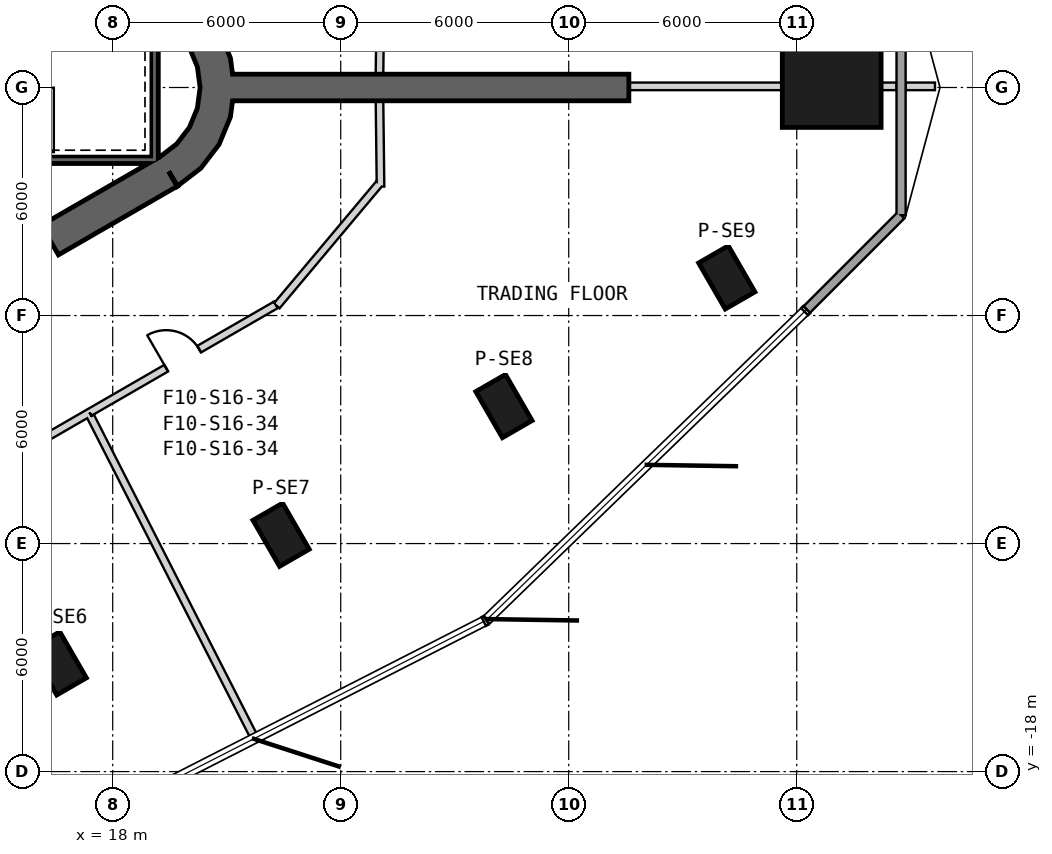
"""IFC4 building model, lengths in metres.
Left out: names, types, materials, properties, quantities, classifications, styles, units other than length and angle.
Written with IfcOpenShell. Run it as: python <this file> out.ifc"""

import sys

from ifc_helpers import new_model, si_unit, direction, frame, frame_2d, origin, origin_2d, place, context, subcontext, project, spatial, polyline, rectangle, outline, extrude, element, fill, save


model = new_model("IFC4")
c1 = context("Model", 3, precision=1e-05, world=origin(), true_north=direction((0.0, 1.0)))
c2 = subcontext(c1, "Body", "Model", "MODEL_VIEW")
j1 = project(units=[si_unit("LENGTHUNIT", "METRE"), si_unit("PLANEANGLEUNIT", "RADIAN")], contexts=[c1])
p1 = place(None, origin())
s1 = spatial("IfcSite", under=j1, at=p1, CompositionType="ELEMENT")
p2 = place(p1, origin())
s2 = spatial("IfcBuilding", under=s1, at=p2, CompositionType="ELEMENT")
p3 = place(p2, frame((0.0, 0.0, 253.2)))
s3 = spatial("IfcBuildingStorey", under=s2, at=p3, CompositionType="ELEMENT", Elevation=253.2)
p4 = place(p3, frame((36.92, 0.0, 0.0), z_axis=(0.0, 0.0, 1.0), x_axis=(1.0, 0.0, 0.0)))
e1 = element("IfcColumn", 1, at=p4, inside=s3, PredefinedType="COLUMN", context=c2, shape_type="SweptSolid", body=[
    extrude(rectangle(XDim=2.6, YDim=2.1, at=origin_2d()), origin(), (0.0, 0.0, 1.0), 4.0),
])
for number, where, z_axis, x_axis in (
    (2, (16.567, -15.154, 0.0), (0.0, 0.0, 1.0), (0.5, -0.866, 0.0)),
    (3, (22.431, -11.768, 0.0), (0.0, 0.0, 1.0), (0.5, -0.866, 0.0)),
    (4, (28.295, -8.383, 0.0), (0.0, 0.0, 1.0), (0.5, -0.866, 0.0)),
    (5, (34.159, -4.997, 0.0), (0.0, 0.0, 1.0), (0.5, -0.866, 0.0)),
):
    element("IfcColumn", number, at=place(p3, frame(where, z_axis=z_axis, x_axis=x_axis)), inside=s3, PredefinedType="COLUMN", context=c2, shape_type="SweptSolid", body=[
        extrude(rectangle(XDim=1.4, YDim=0.9, at=origin_2d()), origin(), (0.0, 0.0, 1.0), 4.0),
    ])
p5 = place(p3, frame((-7.825, -17.97, 0.0), z_axis=(0.0, 0.0, 1.0), x_axis=(0.866028369851, 0.499994862586, 0.0)))
e6 = element("IfcWall", 6, at=p5, inside=s3, PredefinedType="SHEAR", context=c2, shape_type="SweptSolid", body=[
    extrude(rectangle(XDim=31.523, YDim=0.9, at=frame_2d((15.762, 0.0))), origin(), (0.0, 0.0, 1.0), 4.0),
])
p6 = place(p5, frame((7.062, 0.0, 0.0)))
e7 = element("IfcOpeningElement", 7, at=p6, cuts=e6, PredefinedType="OPENING", context=c2, shape_type="SweptSolid", body=[
    extrude(rectangle(XDim=1.2, YDim=2.4, at=frame_2d((0.6, 1.2))), frame((0.0, 0.46, 0.0), z_axis=(0.0, -1.0, 0.0), x_axis=(1.0, 0.0, 0.0)), (0.0, 0.0, 1.0), 0.92),
])
p7 = place(p5, frame((9.762, 0.0, 0.0)))
e8 = element("IfcOpeningElement", 8, at=p7, cuts=e6, PredefinedType="OPENING", context=c2, shape_type="SweptSolid", body=[
    extrude(rectangle(XDim=1.2, YDim=2.4, at=frame_2d((0.6, 1.2))), frame((0.0, 0.46, 0.0), z_axis=(0.0, -1.0, 0.0), x_axis=(1.0, 0.0, 0.0)), (0.0, 0.0, 1.0), 0.92),
])
p8 = place(p5, frame((12.462, 0.0, 0.0)))
e9 = element("IfcOpeningElement", 9, at=p8, cuts=e6, PredefinedType="OPENING", context=c2, shape_type="SweptSolid", body=[
    extrude(rectangle(XDim=1.2, YDim=2.4, at=frame_2d((0.6, 1.2))), frame((0.0, 0.46, 0.0), z_axis=(0.0, -1.0, 0.0), x_axis=(1.0, 0.0, 0.0)), (0.0, 0.0, 1.0), 0.92),
])
p9 = place(p5, frame((15.162, 0.0, 0.0)))
e10 = element("IfcOpeningElement", 10, at=p9, cuts=e6, PredefinedType="OPENING", context=c2, shape_type="SweptSolid", body=[
    extrude(rectangle(XDim=1.2, YDim=2.4, at=frame_2d((0.6, 1.2))), frame((0.0, 0.46, 0.0), z_axis=(0.0, -1.0, 0.0), x_axis=(1.0, 0.0, 0.0)), (0.0, 0.0, 1.0), 0.92),
])
p10 = place(p5, frame((17.862, 0.0, 0.0)))
e11 = element("IfcOpeningElement", 11, at=p10, cuts=e6, PredefinedType="OPENING", context=c2, shape_type="SweptSolid", body=[
    extrude(rectangle(XDim=1.2, YDim=2.4, at=frame_2d((0.6, 1.2))), frame((0.0, 0.46, 0.0), z_axis=(0.0, -1.0, 0.0), x_axis=(1.0, 0.0, 0.0)), (0.0, 0.0, 1.0), 0.92),
])
p11 = place(p5, frame((20.562, 0.0, 0.0)))
e12 = element("IfcOpeningElement", 12, at=p11, cuts=e6, PredefinedType="OPENING", context=c2, shape_type="SweptSolid", body=[
    extrude(rectangle(XDim=1.2, YDim=2.4, at=frame_2d((0.6, 1.2))), frame((0.0, 0.46, 0.0), z_axis=(0.0, -1.0, 0.0), x_axis=(1.0, 0.0, 0.0)), (0.0, 0.0, 1.0), 0.92),
])
p12 = place(p5, frame((26.712, 0.0, 0.0)))
e13 = element("IfcOpeningElement", 13, at=p12, cuts=e6, PredefinedType="OPENING", context=c2, shape_type="SweptSolid", body=[
    extrude(rectangle(XDim=1.2, YDim=2.4, at=frame_2d((0.6, 1.2))), frame((0.0, 0.46, 0.0), z_axis=(0.0, -1.0, 0.0), x_axis=(1.0, 0.0, 0.0)), (0.0, 0.0, 1.0), 0.92),
])
p13 = place(p5, frame((3.612, 0.0, 0.0)))
e14 = element("IfcOpeningElement", 14, at=p13, cuts=e6, PredefinedType="OPENING", context=c2, shape_type="SweptSolid", body=[
    extrude(rectangle(XDim=1.2, YDim=2.4, at=frame_2d((0.6, 1.2))), frame((0.0, 0.46, 0.0), z_axis=(0.0, -1.0, 0.0), x_axis=(1.0, 0.0, 0.0)), (0.0, 0.0, 1.0), 0.92),
])
p14 = place(p3, origin())
e15 = element("IfcWall", 15, at=p14, inside=s3, PredefinedType="SHEAR", context=c2, shape_type="SweptSolid", body=[
    extrude(outline(polyline([(19.7, -2.598), (20.321, -2.121), (20.798, -1.5), (21.098, -0.777), (21.2, 0.0), (21.098, 0.777), (20.798, 1.5), (20.321, 2.121), (19.7, 2.598), (19.25, 1.819), (19.685, 1.485), (20.019, 1.05), (20.229, 0.543), (20.3, 0.0), (20.229, -0.543), (20.019, -1.05), (19.685, -1.485), (19.25, -1.819), (19.7, -2.598)])), origin(), (0.0, 0.0, 1.0), 4.0),
])
p15 = place(p3, frame((21.15, 0.0, 0.0), z_axis=(0.0, 0.0, 1.0), x_axis=(1.0, 0.0, 0.0)))
e16 = element("IfcWall", 16, at=p15, inside=s3, PredefinedType="SHEAR", context=c2, shape_type="SweptSolid", body=[
    extrude(rectangle(XDim=10.433, YDim=0.7, at=frame_2d((5.216, 0.0))), origin(), (0.0, 0.0, 1.0), 4.0),
])
p16 = place(p3, frame((36.263, -5.842, 0.0), z_axis=(0.0, 0.0, 1.0), x_axis=(0.707106781187, 0.707106781187, 0.0)))
e17 = element("IfcWall", 17, at=p16, inside=s3, PredefinedType="SOLIDWALL", context=c2, shape_type="SweptSolid", body=[
    extrude(rectangle(XDim=3.51, YDim=0.24, at=frame_2d((1.755, 0.0))), origin(), (0.0, 0.0, 1.0), 3.7),
])
p17 = place(p3, frame((38.745, -3.36, 0.0), z_axis=(0.0, 0.0, 1.0), x_axis=(0.0, 1.0, 0.0)))
e18 = element("IfcWall", 18, at=p17, inside=s3, PredefinedType="SOLIDWALL", context=c2, shape_type="SweptSolid", body=[
    extrude(rectangle(XDim=6.72, YDim=0.24, at=frame_2d((3.36, 0.0))), origin(), (0.0, 0.0, 1.0), 3.7),
])
p18 = place(p3, frame((19.1, -2.0, -0.3), z_axis=(0.0, 0.0, 1.0), x_axis=(0.0, 1.0, 0.0)))
e19 = element("IfcWall", 19, at=p18, inside=s3, PredefinedType="SHEAR", context=c2, shape_type="SweptSolid", body=[
    extrude(rectangle(XDim=3.8, YDim=0.2, at=frame_2d((1.9, 0.0))), origin(), (0.0, 0.0, 1.0), 4.0),
])
p19 = place(p3, frame((11.1, -1.9, -0.3), z_axis=(0.0, 0.0, 1.0), x_axis=(1.0, 0.0, 0.0)))
e20 = element("IfcWall", 20, at=p19, inside=s3, PredefinedType="SHEAR", context=c2, shape_type="SweptSolid", body=[
    extrude(rectangle(XDim=7.9, YDim=0.2, at=frame_2d((3.95, 0.0))), origin(), (0.0, 0.0, 1.0), 4.0),
])
p20 = place(p3, frame((25.021, 0.35, 0.0), z_axis=(0.0, 0.0, 1.0), x_axis=(0.012334587904, 0.999923926077, 0.0)))
e21 = element("IfcWall", 21, at=p20, inside=s3, PredefinedType="PARTITIONING", context=c2, shape_type="SweptSolid", body=[
    extrude(rectangle(XDim=2.078, YDim=0.2, at=frame_2d((1.039, 0.0))), origin(), (0.0, 0.0, 1.0), 3.7),
])
p21 = place(p3, frame((25.048, -2.608, 0.0), z_axis=(0.0, 0.0, 1.0), x_axis=(-0.012000433251, 0.999927992208, 0.0)))
e22 = element("IfcWall", 22, at=p21, inside=s3, PredefinedType="PARTITIONING", context=c2, shape_type="SweptSolid", body=[
    extrude(rectangle(XDim=2.258, YDim=0.2, at=frame_2d((1.129, 0.0))), origin(), (0.0, 0.0, 1.0), 3.7),
])
p22 = place(p3, frame((22.315, -5.746, 0.0), z_axis=(0.0, 0.0, 1.0), x_axis=(0.642828004621, 0.76601054593, 0.0)))
e23 = element("IfcWall", 23, at=p22, inside=s3, PredefinedType="PARTITIONING", context=c2, shape_type="SweptSolid", body=[
    extrude(rectangle(XDim=4.2, YDim=0.2, at=frame_2d((2.1, 0.0))), origin(), (0.0, 0.0, 1.0), 2.88),
])
p23 = place(p3, frame((6.275, -14.968, 0.0), z_axis=(0.0, 0.0, 1.0), x_axis=(0.866025615516, 0.499999633269, 0.0)))
e24 = element("IfcWall", 24, at=p23, inside=s3, PredefinedType="PARTITIONING", context=c2, shape_type="SweptSolid", body=[
    extrude(rectangle(XDim=12.834, YDim=0.2, at=frame_2d((6.417, 0.0))), origin(), (0.0, 0.0, 1.0), 2.98),
])
p24 = place(p3, frame((17.39, -8.551, 0.0), z_axis=(0.0, 0.0, 1.0), x_axis=(0.866034791923, 0.499983738914, 0.0)))
e25 = element("IfcWall", 25, at=p24, inside=s3, PredefinedType="PARTITIONING", context=c2, shape_type="SweptSolid", body=[
    extrude(rectangle(XDim=5.662, YDim=0.2, at=frame_2d((2.831, 0.0))), origin(), (0.0, 0.0, 1.0), 2.98),
])
p25 = place(p24, frame((2.331, 0.0, 0.0)))
e26 = element("IfcOpeningElement", 26, at=p25, cuts=e25, PredefinedType="OPENING", context=c2, shape_type="SweptSolid", body=[
    extrude(rectangle(XDim=1.0, YDim=2.1, at=frame_2d((0.5, 1.05))), frame((0.0, 0.11, 0.0), z_axis=(0.0, -1.0, 0.0), x_axis=(1.0, 0.0, 0.0)), (0.0, 0.0, 1.0), 0.22),
])
p26 = place(p3, frame((31.583, 0.03, 0.0), z_axis=(0.0, 0.0, 1.0), x_axis=(1.0, 0.0, 0.0)))
e27 = element("IfcWall", 27, at=p26, inside=s3, PredefinedType="PARTITIONING", context=c2, shape_type="SweptSolid", body=[
    extrude(rectangle(XDim=4.038, YDim=0.2, at=frame_2d((2.019, 0.0))), origin(), (0.0, 0.0, 1.0), 3.27),
])
p27 = place(p3, frame((38.22, 0.03, 0.0), z_axis=(0.0, 0.0, 1.0), x_axis=(1.0, 0.0, 0.0)))
e28 = element("IfcWall", 28, at=p27, inside=s3, PredefinedType="PARTITIONING", context=c2, shape_type="SweptSolid", body=[
    extrude(rectangle(XDim=0.406, YDim=0.2, at=frame_2d((0.203, 0.0))), origin(), (0.0, 0.0, 1.0), 3.7),
])
p28 = place(p3, frame((38.865, 0.03, 0.0), z_axis=(0.0, 0.0, 1.0), x_axis=(1.0, 0.0, 0.0)))
e29 = element("IfcWall", 29, at=p28, inside=s3, PredefinedType="PARTITIONING", context=c2, shape_type="SweptSolid", body=[
    extrude(rectangle(XDim=0.772, YDim=0.2, at=frame_2d((0.386, 0.0))), origin(), (0.0, 0.0, 1.0), 3.7),
])
p29 = place(p3, frame((17.416, -8.651, 0.0), z_axis=(0.0, 0.0, 1.0), x_axis=(0.45442670118, -0.890784133926, 0.0)))
e30 = element("IfcWall", 30, at=p29, inside=s3, PredefinedType="PARTITIONING", context=c2, shape_type="SweptSolid", body=[
    extrude(rectangle(XDim=9.512, YDim=0.2, at=frame_2d((4.756, 0.0))), origin(), (0.0, 0.0, 1.0), 2.98),
])
p30 = place(p25, origin())
e31 = element("IfcDoor", 31, at=p30, inside=s3, OperationType="SINGLE_SWING_RIGHT", PredefinedType="USERDEFINED", context=c2, shape_type="SweptSolid", body=[
    extrude(rectangle(XDim=1.0, YDim=2.1, at=frame_2d((0.5, 1.05))), frame((0.0, 0.025, 0.0), z_axis=(0.0, -1.0, 0.0), x_axis=(1.0, 0.0, 0.0)), (0.0, 0.0, 1.0), 0.05),
])
fill(e26, e31)
save(model, sys.argv[1])
